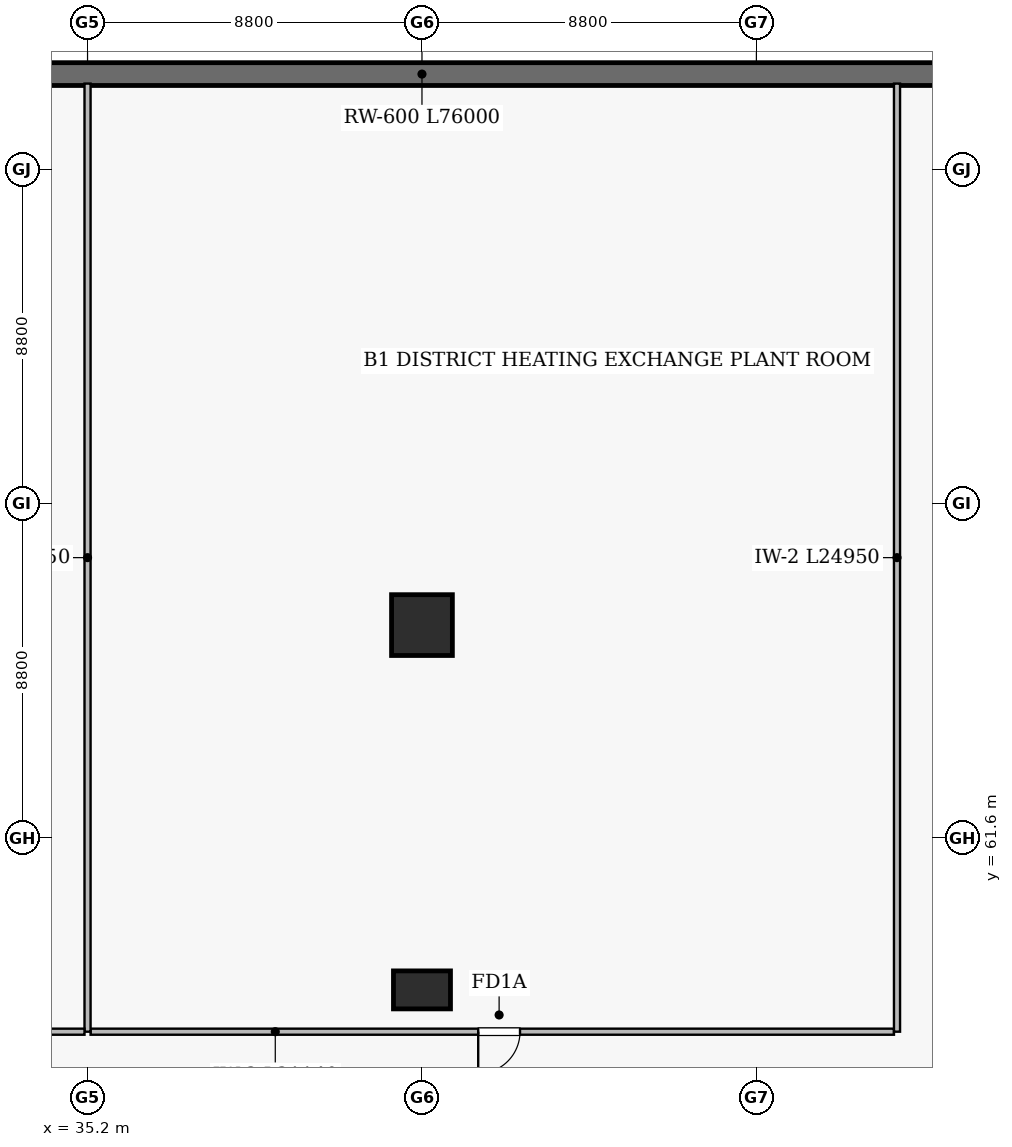
"""IFC4 building model, lengths in metres.
Left out: names, types, materials, properties, quantities, classifications, styles, units other than length and angle.
Written with IfcOpenShell. Run it as: python <this file> out.ifc"""

import sys

from ifc_helpers import new_model, si_unit, direction, frame, frame_2d, origin, origin_2d, place, context, subcontext, project, spatial, rectangle, extrude, element, fill, save


model = new_model("IFC4")
c1 = context("Model", 3, precision=1e-05, world=origin(), true_north=direction((0.0, 1.0)))
c2 = subcontext(c1, "Body", "Model", "MODEL_VIEW")
j1 = project(units=[si_unit("LENGTHUNIT", "METRE"), si_unit("PLANEANGLEUNIT", "RADIAN")], contexts=[c1])
p1 = place(None, origin())
s1 = spatial("IfcSite", under=j1, at=p1, CompositionType="ELEMENT")
p2 = place(p1, origin())
s2 = spatial("IfcBuilding", under=s1, at=p2, CompositionType="ELEMENT")
p3 = place(p2, frame((0.0, 0.0, -3.9)))
s3 = spatial("IfcBuildingStorey", under=s2, at=p3, CompositionType="ELEMENT", Elevation=-3.9)
p4 = place(p3, frame((82.0, 81.7, 0.0), z_axis=(0.0, 0.0, 1.0), x_axis=(-1.0, 0.0, 0.0)))
e1 = element("IfcWall", 1, at=p4, inside=s3, PredefinedType="SOLIDWALL", context=c2, shape_type="SweptSolid", body=[
    extrude(rectangle(XDim=76.0, YDim=0.6, at=frame_2d((38.0, 0.0))), origin(), (0.0, 0.0, 1.0), 3.6),
])
p5 = place(p3, frame((44.0, 57.6, 0.0), z_axis=(0.0, 0.0, 1.0), x_axis=(1.0, 0.0, 0.0)))
e2 = element("IfcColumn", 2, at=p5, inside=s3, PredefinedType="COLUMN", context=c2, shape_type="SweptSolid", body=[
    extrude(rectangle(XDim=1.5, YDim=1.0, at=origin_2d()), origin(), (0.0, 0.0, 1.0), 3.9),
])
p6 = place(p3, frame((44.0, 67.2, 0.0), z_axis=(0.0, 0.0, 1.0), x_axis=(1.0, 0.0, 0.0)))
e3 = element("IfcColumn", 3, at=p6, inside=s3, PredefinedType="COLUMN", context=c2, shape_type="SweptSolid", body=[
    extrude(rectangle(XDim=1.6, YDim=1.6, at=origin_2d()), origin(), (0.0, 0.0, 1.0), 3.9),
])
p7 = place(p3, frame((56.42, 56.5, 0.0), z_axis=(0.0, 0.0, 1.0), x_axis=(-1.0, 0.0, 0.0)))
e4 = element("IfcWall", 4, at=p7, inside=s3, PredefinedType="SOLIDWALL", context=c2, shape_type="SweptSolid", body=[
    extrude(rectangle(XDim=21.14, YDim=0.16, at=frame_2d((10.57, 0.0))), origin(), (0.0, 0.0, 1.0), 2.938),
])
p8 = place(p7, frame((9.84, 0.0, 0.0)))
e5 = element("IfcOpeningElement", 5, at=p8, cuts=e4, PredefinedType="OPENING", context=c2, shape_type="SweptSolid", body=[
    extrude(rectangle(XDim=1.1, YDim=2.15, at=frame_2d((0.55, 1.075))), frame((0.0, 0.09, 0.0), z_axis=(0.0, -1.0, 0.0), x_axis=(1.0, 0.0, 0.0)), (0.0, 0.0, 1.0), 0.18),
])
for number, where, z_axis, x_axis in (
    (6, (35.2, 56.5, 0.0), (0.0, 0.0, 1.0), (0.0, 1.0, 0.0)),
    (7, (56.5, 56.5, 0.0), (0.0, 0.0, 1.0), (0.0, 1.0, 0.0)),
):
    element("IfcWall", number, at=place(p3, frame(where, z_axis=z_axis, x_axis=x_axis)), inside=s3, PredefinedType="SOLIDWALL", context=c2, shape_type="SweptSolid", body=[
        extrude(rectangle(XDim=24.95, YDim=0.16, at=frame_2d((12.475, 0.0))), origin(), (0.0, 0.0, 1.0), 2.888),
    ])
p9 = place(p3, frame((35.12, 56.5, 0.0), z_axis=(0.0, 0.0, 1.0), x_axis=(-1.0, 0.0, 0.0)))
e8 = element("IfcWall", 8, at=p9, inside=s3, PredefinedType="SOLIDWALL", context=c2, shape_type="SweptSolid", body=[
    extrude(rectangle(XDim=4.04, YDim=0.16, at=frame_2d((2.02, 0.0))), origin(), (0.0, 0.0, 1.0), 3.6),
])
p10 = place(p8, origin())
e9 = element("IfcDoor", 9, at=p10, inside=s3, OperationType="SINGLE_SWING_RIGHT", PredefinedType="DOOR", context=c2, shape_type="SweptSolid", body=[
    extrude(rectangle(XDim=1.1, YDim=2.15, at=frame_2d((0.55, 1.075))), frame((0.0, 0.025, 0.0), z_axis=(0.0, -1.0, 0.0), x_axis=(1.0, 0.0, 0.0)), (0.0, 0.0, 1.0), 0.05),
])
fill(e5, e9)
save(model, sys.argv[1])
